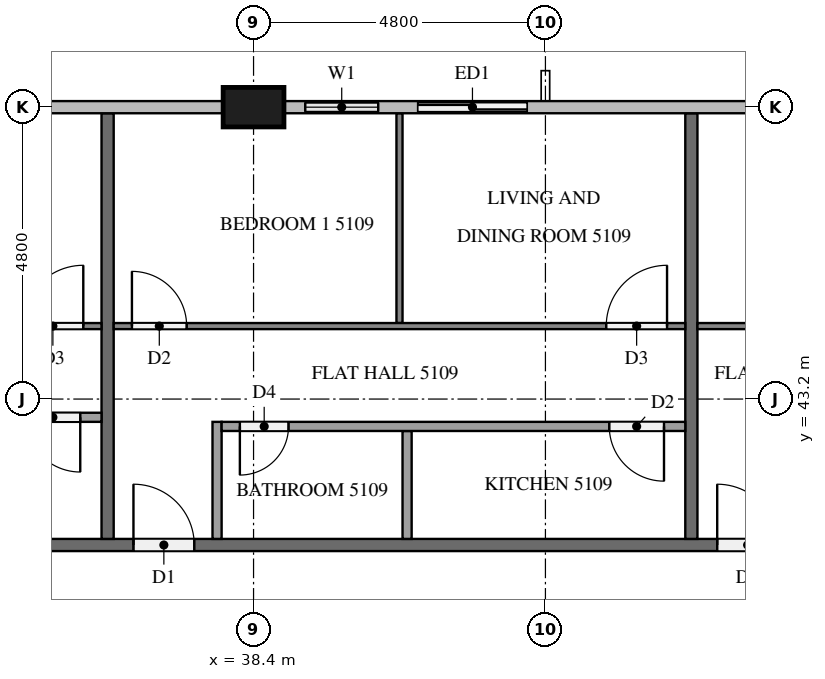
"""IFC4 building model, lengths in metres.
Left out: names, types, materials, properties, quantities, classifications, styles, units other than length and angle.
Written with IfcOpenShell. Run it as: python <this file> out.ifc"""

import sys

from ifc_helpers import new_model, si_unit, direction, frame, frame_2d, origin, origin_2d, place, context, subcontext, project, spatial, rectangle, extrude, element, fill, save


model = new_model("IFC4")
c1 = context("Model", 3, precision=1e-05, world=origin(), true_north=direction((0.0, 1.0)))
c2 = subcontext(c1, "Body", "Model", "MODEL_VIEW")
j1 = project(units=[si_unit("LENGTHUNIT", "METRE"), si_unit("PLANEANGLEUNIT", "RADIAN")], contexts=[c1])
p1 = place(None, origin())
s1 = spatial("IfcSite", under=j1, at=p1, CompositionType="ELEMENT")
p2 = place(p1, origin())
s2 = spatial("IfcBuilding", under=s1, at=p2, CompositionType="ELEMENT")
p3 = place(p2, frame((0.0, 0.0, 196.4)))
s3 = spatial("IfcBuildingStorey", under=s2, at=p3, CompositionType="ELEMENT", Elevation=196.4)
p4 = place(p3, frame((38.4, 48.0, 0.0), z_axis=(0.0, 0.0, 1.0), x_axis=(1.0, 0.0, 0.0)))
e1 = element("IfcColumn", 1, at=p4, inside=s3, PredefinedType="COLUMN", context=c2, shape_type="SweptSolid", body=[
    extrude(rectangle(XDim=1.0, YDim=0.65, at=origin_2d()), origin(), (0.0, 0.0, 1.0), 3.2),
])
p5 = place(p3, frame((43.2, 48.0, 0.0), z_axis=(0.0, 0.0, 1.0), x_axis=(-1.0, 0.0, 0.0)))
e2 = element("IfcWall", 2, at=p5, inside=s3, PredefinedType="SOLIDWALL", context=c2, shape_type="SweptSolid", body=[
    extrude(rectangle(XDim=4.3, YDim=0.15, at=frame_2d((2.15, 0.0))), origin(), (0.0, 0.0, 1.0), 3.2),
])
p6 = place(p5, frame((0.3, 0.0, 0.0)))
e3 = element("IfcOpeningElement", 3, at=p6, cuts=e2, PredefinedType="OPENING", context=c2, shape_type="SweptSolid", body=[
    extrude(rectangle(XDim=1.8, YDim=2.4, at=frame_2d((0.9, 1.2))), frame((0.0, 0.085, 0.0), z_axis=(0.0, -1.0, 0.0), x_axis=(1.0, 0.0, 0.0)), (0.0, 0.0, 1.0), 0.17),
])
p7 = place(p5, frame((2.75, 0.0, 0.9)))
e4 = element("IfcOpeningElement", 4, at=p7, cuts=e2, PredefinedType="OPENING", context=c2, shape_type="SweptSolid", body=[
    extrude(rectangle(XDim=1.2, YDim=1.4, at=frame_2d((0.6, 0.7))), frame((0.0, 0.085, 0.0), z_axis=(0.0, -1.0, 0.0), x_axis=(1.0, 0.0, 0.0)), (0.0, 0.0, 1.0), 0.17),
])
p8 = place(p3, frame((11.9, 40.8, 0.0), z_axis=(0.0, 0.0, 1.0), x_axis=(1.0, 0.0, 0.0)))
e5 = element("IfcWall", 5, at=p8, inside=s3, PredefinedType="PARTITIONING", context=c2, shape_type="SweptSolid", body=[
    extrude(rectangle(XDim=38.6, YDim=0.2, at=frame_2d((19.3, 0.0))), origin(), (0.0, 0.0, 1.0), 3.2),
])
p9 = place(p8, frame((34.125, 0.0, 0.0)))
e6 = element("IfcOpeningElement", 6, at=p9, cuts=e5, PredefinedType="OPENING", context=c2, shape_type="SweptSolid", body=[
    extrude(rectangle(XDim=1.0, YDim=2.1, at=frame_2d((0.5, 1.05))), frame((0.0, 0.11, 0.0), z_axis=(0.0, -1.0, 0.0), x_axis=(1.0, 0.0, 0.0)), (0.0, 0.0, 1.0), 0.22),
])
p10 = place(p8, frame((24.525, 0.0, 0.0)))
e7 = element("IfcOpeningElement", 7, at=p10, cuts=e5, PredefinedType="OPENING", context=c2, shape_type="SweptSolid", body=[
    extrude(rectangle(XDim=1.0, YDim=2.1, at=frame_2d((0.5, 1.05))), frame((0.0, 0.11, 0.0), z_axis=(0.0, -1.0, 0.0), x_axis=(1.0, 0.0, 0.0)), (0.0, 0.0, 1.0), 0.22),
])
p11 = place(p8, frame((7.725, 0.0, 0.0)))
e8 = element("IfcOpeningElement", 8, at=p11, cuts=e5, PredefinedType="OPENING", context=c2, shape_type="SweptSolid", body=[
    extrude(rectangle(XDim=1.0, YDim=2.1, at=frame_2d((0.5, 1.05))), frame((0.0, 0.11, 0.0), z_axis=(0.0, -1.0, 0.0), x_axis=(1.0, 0.0, 0.0)), (0.0, 0.0, 1.0), 0.22),
])
p12 = place(p8, frame((5.875, 0.0, 0.0)))
e9 = element("IfcOpeningElement", 9, at=p12, cuts=e5, PredefinedType="OPENING", context=c2, shape_type="SweptSolid", body=[
    extrude(rectangle(XDim=1.0, YDim=2.1, at=frame_2d((0.5, 1.05))), frame((0.0, 0.11, 0.0), z_axis=(0.0, -1.0, 0.0), x_axis=(1.0, 0.0, 0.0)), (0.0, 0.0, 1.0), 0.22),
])
for number, where, z_axis, x_axis in (
    (10, (45.6, 47.9, 0.0), (0.0, 0.0, 1.0), (0.0, -1.0, 0.0)),
    (11, (36.0, 47.9, 0.0), (0.0, 0.0, 1.0), (0.0, -1.0, 0.0)),
):
    element("IfcWall", number, at=place(p3, frame(where, z_axis=z_axis, x_axis=x_axis)), inside=s3, PredefinedType="PARTITIONING", context=c2, shape_type="SweptSolid", body=[
        extrude(rectangle(XDim=7.0, YDim=0.2, at=frame_2d((3.5, 0.0))), origin(), (0.0, 0.0, 1.0), 3.2),
    ])
p13 = place(p3, frame((45.7, 44.4, 0.0), z_axis=(0.0, 0.0, 1.0), x_axis=(1.0, 0.0, 0.0)))
e12 = element("IfcWall", 12, at=p13, inside=s3, PredefinedType="PARTITIONING", context=c2, shape_type="SweptSolid", body=[
    extrude(rectangle(XDim=16.279, YDim=0.1, at=frame_2d((8.139, 0.0))), origin(), (0.0, 0.0, 1.0), 3.2),
])
p14 = place(p13, frame((5.75, 0.0, 0.0)))
e13 = element("IfcOpeningElement", 13, at=p14, cuts=e12, PredefinedType="OPENING", context=c2, shape_type="SweptSolid", body=[
    extrude(rectangle(XDim=1.0, YDim=2.1, at=frame_2d((0.5, 1.05))), frame((0.0, 0.06, 0.0), z_axis=(0.0, -1.0, 0.0), x_axis=(1.0, 0.0, 0.0)), (0.0, 0.0, 1.0), 0.12),
])
p15 = place(p13, frame((7.45, 0.0, 0.0)))
e14 = element("IfcOpeningElement", 14, at=p15, cuts=e12, PredefinedType="OPENING", context=c2, shape_type="SweptSolid", body=[
    extrude(rectangle(XDim=0.9, YDim=2.1, at=frame_2d((0.45, 1.05))), frame((0.0, 0.06, 0.0), z_axis=(0.0, -1.0, 0.0), x_axis=(1.0, 0.0, 0.0)), (0.0, 0.0, 1.0), 0.12),
])
p16 = place(p13, frame((15.079, 0.0, 0.0)))
e15 = element("IfcOpeningElement", 15, at=p16, cuts=e12, PredefinedType="OPENING", context=c2, shape_type="SweptSolid", body=[
    extrude(rectangle(XDim=0.9, YDim=2.1, at=frame_2d((0.45, 1.05))), frame((0.0, 0.06, 0.0), z_axis=(0.0, -1.0, 0.0), x_axis=(1.0, 0.0, 0.0)), (0.0, 0.0, 1.0), 0.12),
])
p17 = place(p3, frame((40.8, 44.45, 0.0), z_axis=(0.0, 0.0, 1.0), x_axis=(0.0, 1.0, 0.0)))
e16 = element("IfcWall", 16, at=p17, inside=s3, PredefinedType="PARTITIONING", context=c2, shape_type="SweptSolid", body=[
    extrude(rectangle(XDim=3.45, YDim=0.1, at=frame_2d((1.725, 0.0))), origin(), (0.0, 0.0, 1.0), 3.2),
])
p18 = place(p3, frame((36.1, 44.4, 0.0), z_axis=(0.0, 0.0, 1.0), x_axis=(1.0, 0.0, 0.0)))
e17 = element("IfcWall", 17, at=p18, inside=s3, PredefinedType="PARTITIONING", context=c2, shape_type="SweptSolid", body=[
    extrude(rectangle(XDim=9.4, YDim=0.1, at=frame_2d((4.7, 0.0))), origin(), (0.0, 0.0, 1.0), 3.2),
])
p19 = place(p18, frame((0.3, 0.0, 0.0)))
e18 = element("IfcOpeningElement", 18, at=p19, cuts=e17, PredefinedType="OPENING", context=c2, shape_type="SweptSolid", body=[
    extrude(rectangle(XDim=0.9, YDim=2.1, at=frame_2d((0.45, 1.05))), frame((0.0, 0.06, 0.0), z_axis=(0.0, -1.0, 0.0), x_axis=(1.0, 0.0, 0.0)), (0.0, 0.0, 1.0), 0.12),
])
p20 = place(p18, frame((8.1, 0.0, 0.0)))
e19 = element("IfcOpeningElement", 19, at=p20, cuts=e17, PredefinedType="OPENING", context=c2, shape_type="SweptSolid", body=[
    extrude(rectangle(XDim=1.0, YDim=2.1, at=frame_2d((0.5, 1.05))), frame((0.0, 0.06, 0.0), z_axis=(0.0, -1.0, 0.0), x_axis=(1.0, 0.0, 0.0)), (0.0, 0.0, 1.0), 0.12),
])
p21 = place(p3, frame((40.925, 40.9, 0.0), z_axis=(0.0, 0.0, 1.0), x_axis=(0.0, 1.0, 0.0)))
e20 = element("IfcWall", 20, at=p21, inside=s3, PredefinedType="PARTITIONING", context=c2, shape_type="SweptSolid", body=[
    extrude(rectangle(XDim=1.775, YDim=0.15, at=frame_2d((0.888, 0.0))), origin(), (0.0, 0.0, 1.0), 3.2),
])
p22 = place(p3, frame((37.8, 40.9, 0.0), z_axis=(0.0, 0.0, 1.0), x_axis=(0.0, 1.0, 0.0)))
e21 = element("IfcWall", 21, at=p22, inside=s3, PredefinedType="PARTITIONING", context=c2, shape_type="SweptSolid", body=[
    extrude(rectangle(XDim=1.925, YDim=0.15, at=frame_2d((0.962, 0.0))), origin(), (0.0, 0.0, 1.0), 3.2),
])
p23 = place(p3, frame((45.5, 42.75, 0.0), z_axis=(0.0, 0.0, 1.0), x_axis=(-1.0, 0.0, 0.0)))
e22 = element("IfcWall", 22, at=p23, inside=s3, PredefinedType="PARTITIONING", context=c2, shape_type="SweptSolid", body=[
    extrude(rectangle(XDim=7.625, YDim=0.15, at=frame_2d((3.812, 0.0))), origin(), (0.0, 0.0, 1.0), 3.2),
])
p24 = place(p23, frame((6.525, 0.0, 0.0)))
e23 = element("IfcOpeningElement", 23, at=p24, cuts=e22, PredefinedType="OPENING", context=c2, shape_type="SweptSolid", body=[
    extrude(rectangle(XDim=0.8, YDim=2.1, at=frame_2d((0.4, 1.05))), frame((0.0, 0.085, 0.0), z_axis=(0.0, -1.0, 0.0), x_axis=(1.0, 0.0, 0.0)), (0.0, 0.0, 1.0), 0.17),
])
p25 = place(p23, frame((0.35, 0.0, 0.0)))
e24 = element("IfcOpeningElement", 24, at=p25, cuts=e22, PredefinedType="OPENING", context=c2, shape_type="SweptSolid", body=[
    extrude(rectangle(XDim=0.9, YDim=2.1, at=frame_2d((0.45, 1.05))), frame((0.0, 0.085, 0.0), z_axis=(0.0, -1.0, 0.0), x_axis=(1.0, 0.0, 0.0)), (0.0, 0.0, 1.0), 0.17),
])
p26 = place(p3, frame((19.3, 44.4, 0.0), z_axis=(0.0, 0.0, 1.0), x_axis=(1.0, 0.0, 0.0)))
e25 = element("IfcWall", 25, at=p26, inside=s3, PredefinedType="PARTITIONING", context=c2, shape_type="SweptSolid", body=[
    extrude(rectangle(XDim=16.6, YDim=0.1, at=frame_2d((8.3, 0.0))), origin(), (0.0, 0.0, 1.0), 3.2),
])
p27 = place(p26, frame((3.45, 0.0, 0.0)))
e26 = element("IfcOpeningElement", 26, at=p27, cuts=e25, PredefinedType="OPENING", context=c2, shape_type="SweptSolid", body=[
    extrude(rectangle(XDim=0.9, YDim=2.1, at=frame_2d((0.45, 1.05))), frame((0.0, 0.06, 0.0), z_axis=(0.0, -1.0, 0.0), x_axis=(1.0, 0.0, 0.0)), (0.0, 0.0, 1.0), 0.12),
])
p28 = place(p26, frame((5.05, 0.0, 0.0)))
e27 = element("IfcOpeningElement", 27, at=p28, cuts=e25, PredefinedType="OPENING", context=c2, shape_type="SweptSolid", body=[
    extrude(rectangle(XDim=0.9, YDim=2.1, at=frame_2d((0.45, 1.05))), frame((0.0, 0.06, 0.0), z_axis=(0.0, -1.0, 0.0), x_axis=(1.0, 0.0, 0.0)), (0.0, 0.0, 1.0), 0.12),
])
p29 = place(p26, frame((15.3, 0.0, 0.0)))
e28 = element("IfcOpeningElement", 28, at=p29, cuts=e25, PredefinedType="OPENING", context=c2, shape_type="SweptSolid", body=[
    extrude(rectangle(XDim=1.0, YDim=2.1, at=frame_2d((0.5, 1.05))), frame((0.0, 0.06, 0.0), z_axis=(0.0, -1.0, 0.0), x_axis=(1.0, 0.0, 0.0)), (0.0, 0.0, 1.0), 0.12),
])
p30 = place(p3, frame((35.9, 42.9, 0.0), z_axis=(0.0, 0.0, 1.0), x_axis=(-1.0, 0.0, 0.0)))
e29 = element("IfcWall", 29, at=p30, inside=s3, PredefinedType="PARTITIONING", context=c2, shape_type="SweptSolid", body=[
    extrude(rectangle(XDim=14.825, YDim=0.15, at=frame_2d((7.413, 0.0))), origin(), (0.0, 0.0, 1.0), 3.2),
])
p31 = place(p30, frame((8.308, 0.0, 0.0)))
e30 = element("IfcOpeningElement", 30, at=p31, cuts=e29, PredefinedType="OPENING", context=c2, shape_type="SweptSolid", body=[
    extrude(rectangle(XDim=0.9, YDim=2.1, at=frame_2d((0.45, 1.05))), frame((0.0, 0.085, 0.0), z_axis=(0.0, -1.0, 0.0), x_axis=(1.0, 0.0, 0.0)), (0.0, 0.0, 1.0), 0.17),
])
p32 = place(p30, frame((6.858, 0.0, 0.0)))
e31 = element("IfcOpeningElement", 31, at=p32, cuts=e29, PredefinedType="OPENING", context=c2, shape_type="SweptSolid", body=[
    extrude(rectangle(XDim=0.8, YDim=2.1, at=frame_2d((0.4, 1.05))), frame((0.0, 0.085, 0.0), z_axis=(0.0, -1.0, 0.0), x_axis=(1.0, 0.0, 0.0)), (0.0, 0.0, 1.0), 0.17),
])
p33 = place(p30, frame((0.35, 0.0, 0.0)))
e32 = element("IfcOpeningElement", 32, at=p33, cuts=e29, PredefinedType="OPENING", context=c2, shape_type="SweptSolid", body=[
    extrude(rectangle(XDim=0.9, YDim=2.1, at=frame_2d((0.45, 1.05))), frame((0.0, 0.085, 0.0), z_axis=(0.0, -1.0, 0.0), x_axis=(1.0, 0.0, 0.0)), (0.0, 0.0, 1.0), 0.17),
])
p34 = place(p6, origin())
e33 = element("IfcDoor", 33, at=p34, inside=s3, OperationType="SLIDING_TO_RIGHT", PredefinedType="DOOR", context=c2, shape_type="SweptSolid", body=[
    extrude(rectangle(XDim=1.8, YDim=2.4, at=frame_2d((0.9, 1.2))), frame((0.0, 0.025, 0.0), z_axis=(0.0, -1.0, 0.0), x_axis=(1.0, 0.0, 0.0)), (0.0, 0.0, 1.0), 0.05),
])
fill(e3, e33)
p35 = place(p7, origin())
e34 = element("IfcWindow", 34, at=p35, inside=s3, PartitioningType="SINGLE_PANEL", PredefinedType="WINDOW", context=c2, shape_type="SweptSolid", body=[
    extrude(rectangle(XDim=1.2, YDim=1.4, at=frame_2d((0.6, 0.7))), frame((0.0, 0.03, 0.0), z_axis=(0.0, -1.0, 0.0), x_axis=(1.0, 0.0, 0.0)), (0.0, 0.0, 1.0), 0.06),
])
fill(e4, e34)
p36 = place(p9, origin())
e35 = element("IfcDoor", 35, at=p36, inside=s3, OperationType="SINGLE_SWING_LEFT", PredefinedType="DOOR", context=c2, shape_type="SweptSolid", body=[
    extrude(rectangle(XDim=1.0, YDim=2.1, at=frame_2d((0.5, 1.05))), frame((0.0, 0.025, 0.0), z_axis=(0.0, -1.0, 0.0), x_axis=(1.0, 0.0, 0.0)), (0.0, 0.0, 1.0), 0.05),
])
fill(e6, e35)
p37 = place(p10, origin())
e36 = element("IfcDoor", 36, at=p37, inside=s3, OperationType="SINGLE_SWING_LEFT", PredefinedType="DOOR", context=c2, shape_type="SweptSolid", body=[
    extrude(rectangle(XDim=1.0, YDim=2.1, at=frame_2d((0.5, 1.05))), frame((0.0, 0.025, 0.0), z_axis=(0.0, -1.0, 0.0), x_axis=(1.0, 0.0, 0.0)), (0.0, 0.0, 1.0), 0.05),
])
fill(e7, e36)
p38 = place(p19, origin())
e37 = element("IfcDoor", 37, at=p38, inside=s3, OperationType="SINGLE_SWING_LEFT", PredefinedType="DOOR", context=c2, shape_type="SweptSolid", body=[
    extrude(rectangle(XDim=0.9, YDim=2.1, at=frame_2d((0.45, 1.05))), frame((0.0, 0.025, 0.0), z_axis=(0.0, -1.0, 0.0), x_axis=(1.0, 0.0, 0.0)), (0.0, 0.0, 1.0), 0.05),
])
fill(e18, e37)
p39 = place(p20, origin())
e38 = element("IfcDoor", 38, at=p39, inside=s3, OperationType="SINGLE_SWING_RIGHT", PredefinedType="DOOR", context=c2, shape_type="SweptSolid", body=[
    extrude(rectangle(XDim=1.0, YDim=2.1, at=frame_2d((0.5, 1.05))), frame((0.0, 0.025, 0.0), z_axis=(0.0, -1.0, 0.0), x_axis=(1.0, 0.0, 0.0)), (0.0, 0.0, 1.0), 0.05),
])
fill(e19, e38)
p40 = place(p24, origin())
e39 = element("IfcDoor", 39, at=p40, inside=s3, OperationType="SINGLE_SWING_RIGHT", PredefinedType="DOOR", context=c2, shape_type="SweptSolid", body=[
    extrude(rectangle(XDim=0.8, YDim=2.1, at=frame_2d((0.4, 1.05))), frame((0.0, 0.025, 0.0), z_axis=(0.0, -1.0, 0.0), x_axis=(1.0, 0.0, 0.0)), (0.0, 0.0, 1.0), 0.05),
])
fill(e23, e39)
p41 = place(p25, origin())
e40 = element("IfcDoor", 40, at=p41, inside=s3, OperationType="SINGLE_SWING_LEFT", PredefinedType="DOOR", context=c2, shape_type="SweptSolid", body=[
    extrude(rectangle(XDim=0.9, YDim=2.1, at=frame_2d((0.45, 1.05))), frame((0.0, 0.025, 0.0), z_axis=(0.0, -1.0, 0.0), x_axis=(1.0, 0.0, 0.0)), (0.0, 0.0, 1.0), 0.05),
])
fill(e24, e40)
p42 = place(p29, origin())
e41 = element("IfcDoor", 41, at=p42, inside=s3, OperationType="SINGLE_SWING_RIGHT", PredefinedType="DOOR", context=c2, shape_type="SweptSolid", body=[
    extrude(rectangle(XDim=1.0, YDim=2.1, at=frame_2d((0.5, 1.05))), frame((0.0, 0.025, 0.0), z_axis=(0.0, -1.0, 0.0), x_axis=(1.0, 0.0, 0.0)), (0.0, 0.0, 1.0), 0.05),
])
fill(e28, e41)
p43 = place(p33, origin())
e42 = element("IfcDoor", 42, at=p43, inside=s3, OperationType="SINGLE_SWING_LEFT", PredefinedType="DOOR", context=c2, shape_type="SweptSolid", body=[
    extrude(rectangle(XDim=0.9, YDim=2.1, at=frame_2d((0.45, 1.05))), frame((0.0, 0.025, 0.0), z_axis=(0.0, -1.0, 0.0), x_axis=(1.0, 0.0, 0.0)), (0.0, 0.0, 1.0), 0.05),
])
fill(e32, e42)
save(model, sys.argv[1])
